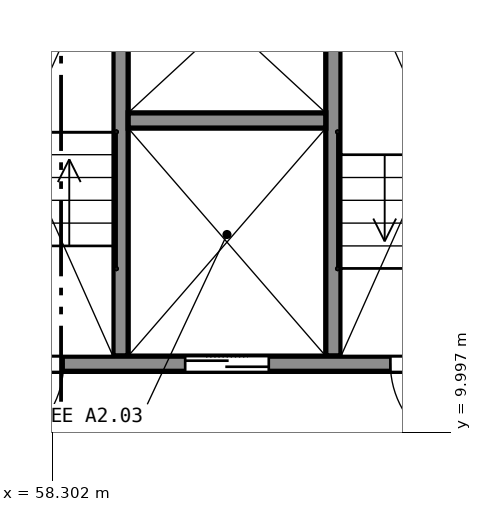
"""IFC4 building model, lengths in metres.
Left out: names, types, materials, properties, quantities, classifications, styles, units other than length and angle.
Written with IfcOpenShell. Run it as: python <this file> out.ifc"""

import sys

from ifc_helpers import new_model, si_unit, direction, frame, frame_2d, origin, place, context, subcontext, project, spatial, rectangle, extrude, element, fill, save


model = new_model("IFC4")
c1 = context("Model", 3, precision=1e-05, world=origin(), true_north=direction((0.0, 1.0)))
c2 = subcontext(c1, "Body", "Model", "MODEL_VIEW")
j1 = project(units=[si_unit("LENGTHUNIT", "METRE"), si_unit("PLANEANGLEUNIT", "RADIAN")], contexts=[c1])
p1 = place(None, origin())
s1 = spatial("IfcSite", under=j1, at=p1, CompositionType="ELEMENT")
p2 = place(p1, origin())
s2 = spatial("IfcBuilding", under=s1, at=p2, CompositionType="ELEMENT")
p3 = place(p2, frame((0.0, 0.0, 20.0)))
s3 = spatial("IfcBuildingStorey", under=s2, at=p3, CompositionType="ELEMENT", Elevation=20.0)
p4 = place(p3, frame((56.6, 10.9, 0.0), z_axis=(0.0, 0.0, 1.0), x_axis=(1.0, 0.0, 0.0)))
e1 = element("IfcWall", 1, at=p4, inside=s3, PredefinedType="SHEAR", context=c2, shape_type="SweptSolid", body=[
    extrude(rectangle(XDim=8.0, YDim=0.2, at=frame_2d((4.0, 0.0))), origin(), (0.0, 0.0, 1.0), 5.0),
])
p5 = place(p4, frame((0.65, 0.0, 0.0)))
e2 = element("IfcOpeningElement", 2, at=p5, cuts=e1, PredefinedType="OPENING", context=c2, shape_type="SweptSolid", body=[
    extrude(rectangle(XDim=1.2, YDim=2.1, at=frame_2d((0.6, 1.05))), frame((0.0, 0.11, 0.0), z_axis=(0.0, -1.0, 0.0), x_axis=(1.0, 0.0, 0.0)), (0.0, 0.0, 1.0), 0.22),
])
p6 = place(p4, frame((6.15, 0.0, 0.0)))
e3 = element("IfcOpeningElement", 3, at=p6, cuts=e1, PredefinedType="OPENING", context=c2, shape_type="SweptSolid", body=[
    extrude(rectangle(XDim=1.2, YDim=2.1, at=frame_2d((0.6, 1.05))), frame((0.0, 0.11, 0.0), z_axis=(0.0, -1.0, 0.0), x_axis=(1.0, 0.0, 0.0)), (0.0, 0.0, 1.0), 0.22),
])
p7 = place(p4, frame((3.45, 0.0, 0.0)))
e4 = element("IfcOpeningElement", 4, at=p7, cuts=e1, PredefinedType="OPENING", context=c2, shape_type="SweptSolid", body=[
    extrude(rectangle(XDim=1.1, YDim=2.1, at=frame_2d((0.55, 1.05))), frame((0.0, 0.11, 0.0), z_axis=(0.0, -1.0, 0.0), x_axis=(1.0, 0.0, 0.0)), (0.0, 0.0, 1.0), 0.22),
])
for number, where, z_axis, x_axis in (
    (5, (59.2, 11.0, 0.0), (0.0, 0.0, 1.0), (0.0, 1.0, 0.0)),
    (6, (62.0, 11.0, 0.0), (0.0, 0.0, 1.0), (0.0, 1.0, 0.0)),
):
    element("IfcWall", number, at=place(p3, frame(where, z_axis=z_axis, x_axis=x_axis)), inside=s3, PredefinedType="SHEAR", context=c2, shape_type="SweptSolid", body=[
        extrude(rectangle(XDim=5.6, YDim=0.2, at=frame_2d((2.8, 0.0))), origin(), (0.0, 0.0, 1.0), 5.0),
    ])
p8 = place(p3, frame((59.3, 14.1, 0.0), z_axis=(0.0, 0.0, 1.0), x_axis=(1.0, 0.0, 0.0)))
e7 = element("IfcWall", 7, at=p8, inside=s3, PredefinedType="SHEAR", context=c2, shape_type="SweptSolid", body=[
    extrude(rectangle(XDim=2.6, YDim=0.2, at=frame_2d((1.3, 0.0))), origin(), (0.0, 0.0, 1.0), 5.0),
])
p9 = place(p5, origin())
e8 = element("IfcDoor", 8, at=p9, inside=s3, OperationType="SINGLE_SWING_LEFT", PredefinedType="DOOR", context=c2, shape_type="SweptSolid", body=[
    extrude(rectangle(XDim=1.2, YDim=2.1, at=frame_2d((0.6, 1.05))), frame((0.0, 0.025, 0.0), z_axis=(0.0, -1.0, 0.0), x_axis=(1.0, 0.0, 0.0)), (0.0, 0.0, 1.0), 0.05),
])
fill(e2, e8)
p10 = place(p6, origin())
e9 = element("IfcDoor", 9, at=p10, inside=s3, OperationType="SINGLE_SWING_RIGHT", PredefinedType="DOOR", context=c2, shape_type="SweptSolid", body=[
    extrude(rectangle(XDim=1.2, YDim=2.1, at=frame_2d((0.6, 1.05))), frame((0.0, 0.025, 0.0), z_axis=(0.0, -1.0, 0.0), x_axis=(1.0, 0.0, 0.0)), (0.0, 0.0, 1.0), 0.05),
])
fill(e3, e9)
p11 = place(p7, origin())
e10 = element("IfcDoor", 10, at=p11, inside=s3, OperationType="DOUBLE_DOOR_SLIDING", PredefinedType="DOOR", context=c2, shape_type="SweptSolid", body=[
    extrude(rectangle(XDim=1.1, YDim=2.1, at=frame_2d((0.55, 1.05))), frame((0.0, 0.025, 0.0), z_axis=(0.0, -1.0, 0.0), x_axis=(1.0, 0.0, 0.0)), (0.0, 0.0, 1.0), 0.05),
])
fill(e4, e10)
save(model, sys.argv[1])
